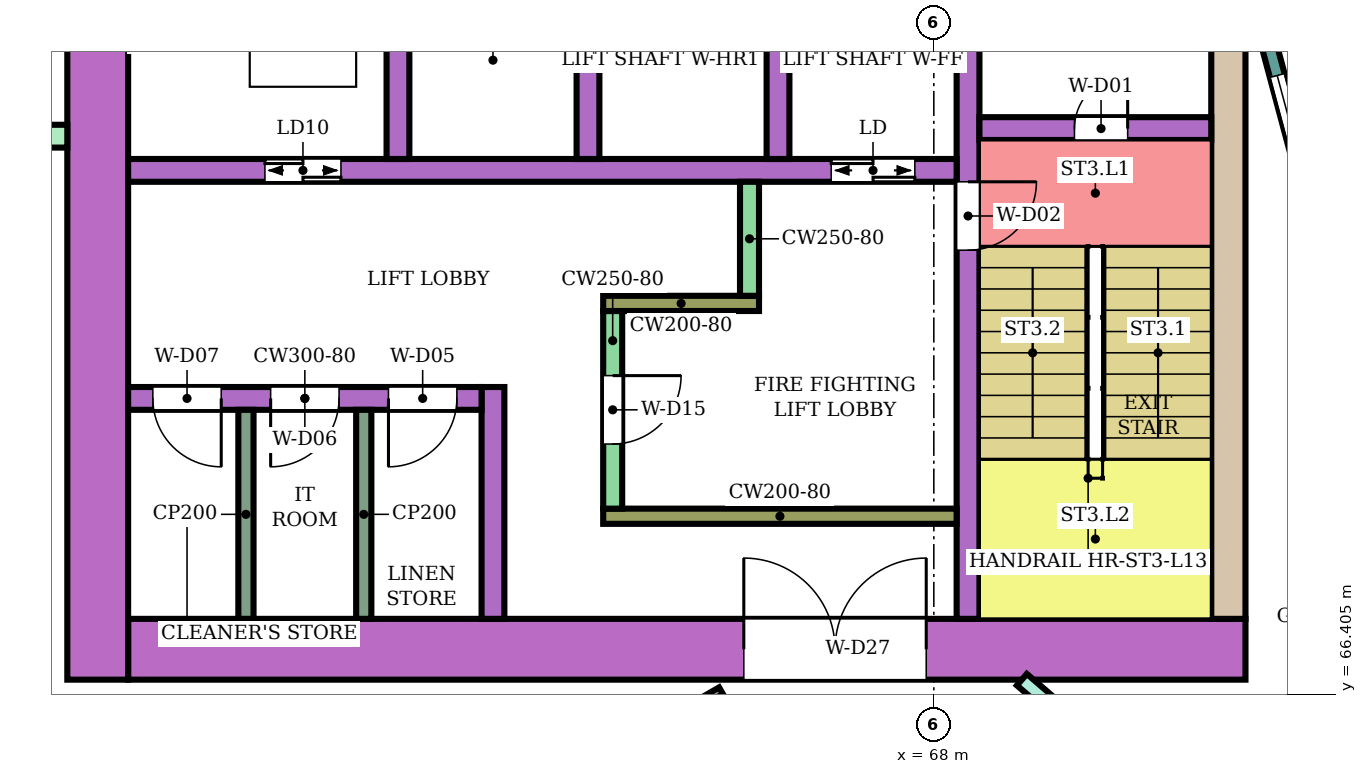
"""IFC4 building model, lengths in metres.
Left out: names, types, materials, properties, quantities, classifications, styles, units other than length and angle.
Written with IfcOpenShell. Run it as: python <this file> out.ifc"""

import sys

from ifc_helpers import new_model, si_unit, direction, frame, frame_2d, origin, place, context, subcontext, project, spatial, rectangle, extrude, element, fill, save


model = new_model("IFC4")
c1 = context("Model", 3, precision=1e-05, world=origin(), true_north=direction((0.0, 1.0)))
c2 = subcontext(c1, "Body", "Model", "MODEL_VIEW")
j1 = project(units=[si_unit("LENGTHUNIT", "METRE"), si_unit("PLANEANGLEUNIT", "RADIAN")], contexts=[c1])
p1 = place(None, origin())
s1 = spatial("IfcSite", under=j1, at=p1, CompositionType="ELEMENT")
p2 = place(p1, origin())
s2 = spatial("IfcBuilding", under=s1, at=p2, CompositionType="ELEMENT")
p3 = place(p2, frame((0.0, 0.0, 59.2)))
s3 = spatial("IfcBuildingStorey", under=s2, at=p3, CompositionType="ELEMENT", Elevation=59.2)
p4 = place(p3, frame((72.1, 67.0, 0.0), z_axis=(0.0, 0.0, 1.0), x_axis=(-1.0, 0.0, 0.0)))
e1 = element("IfcWall", 1, at=p4, inside=s3, PredefinedType="SHEAR", context=c2, shape_type="SweptSolid", body=[
    extrude(rectangle(XDim=14.7, YDim=0.8, at=frame_2d((7.35, 0.0))), origin(), (0.0, 0.0, 1.0), 3.48),
])
p5 = place(p4, frame((4.2, 0.0, 0.0)))
e2 = element("IfcOpeningElement", 2, at=p5, cuts=e1, PredefinedType="OPENING", context=c2, shape_type="SweptSolid", body=[
    extrude(rectangle(XDim=2.4, YDim=2.4, at=frame_2d((1.2, 1.2))), frame((0.0, 0.41, 0.0), z_axis=(0.0, -1.0, 0.0), x_axis=(1.0, 0.0, 0.0)), (0.0, 0.0, 1.0), 0.82),
])
p6 = place(p3, frame((71.875, 75.0, 0.0), z_axis=(0.0, 0.0, 1.0), x_axis=(0.0, -1.0, 0.0)))
e3 = element("IfcWall", 3, at=p6, inside=s3, PredefinedType="SHEAR", context=c2, shape_type="SweptSolid", body=[
    extrude(rectangle(XDim=7.6, YDim=0.45, at=frame_2d((3.8, 0.0))), origin(), (0.0, 0.0, 1.0), 3.48),
])
p7 = place(p3, frame((57.0, 83.4, 0.0), z_axis=(0.0, 0.0, 1.0), x_axis=(0.0, -1.0, 0.0)))
e4 = element("IfcWall", 4, at=p7, inside=s3, PredefinedType="SHEAR", context=c2, shape_type="SweptSolid", body=[
    extrude(rectangle(XDim=16.8, YDim=0.8, at=frame_2d((8.4, 0.0))), origin(), (0.0, 0.0, 1.0), 3.48),
])
p8 = place(p3, frame((68.45, 75.0, 0.0), z_axis=(0.0, 0.0, 1.0), x_axis=(0.0, -1.0, 0.0)))
e5 = element("IfcWall", 5, at=p8, inside=s3, PredefinedType="SHEAR", context=c2, shape_type="SweptSolid", body=[
    extrude(rectangle(XDim=7.6, YDim=0.3, at=frame_2d((3.8, 0.0))), origin(), (0.0, 0.0, 1.0), 3.48),
])
p9 = place(p8, frame((1.85, 0.0, 0.0)))
e6 = element("IfcOpeningElement", 6, at=p9, cuts=e5, PredefinedType="OPENING", context=c2, shape_type="SweptSolid", body=[
    extrude(rectangle(XDim=0.9, YDim=2.1, at=frame_2d((0.45, 1.05))), frame((0.0, 0.16, 0.0), z_axis=(0.0, -1.0, 0.0), x_axis=(1.0, 0.0, 0.0)), (0.0, 0.0, 1.0), 0.32),
])
p10 = place(p3, frame((71.65, 73.85, 0.0), z_axis=(0.0, 0.0, 1.0), x_axis=(-1.0, 0.0, 0.0)))
e7 = element("IfcWall", 7, at=p10, inside=s3, PredefinedType="SHEAR", context=c2, shape_type="SweptSolid", body=[
    extrude(rectangle(XDim=3.05, YDim=0.3, at=frame_2d((1.525, 0.0))), origin(), (0.0, 0.0, 1.0), 3.48),
])
p11 = place(p10, frame((1.1, 0.0, 0.0)))
e8 = element("IfcOpeningElement", 8, at=p11, cuts=e7, PredefinedType="OPENING", context=c2, shape_type="SweptSolid", body=[
    extrude(rectangle(XDim=0.7, YDim=2.0, at=frame_2d((0.35, 1.0))), frame((0.0, 0.16, 0.0), z_axis=(0.0, -1.0, 0.0), x_axis=(1.0, 0.0, 0.0)), (0.0, 0.0, 1.0), 0.32),
])
p12 = place(p3, frame((68.3, 73.3, 0.0), z_axis=(0.0, 0.0, 1.0), x_axis=(-1.0, 0.0, 0.0)))
e9 = element("IfcWall", 9, at=p12, inside=s3, PredefinedType="SHEAR", context=c2, shape_type="SweptSolid", body=[
    extrude(rectangle(XDim=10.9, YDim=0.3, at=frame_2d((5.45, 0.0))), origin(), (0.0, 0.0, 1.0), 3.48),
])
p13 = place(p12, frame((0.55, 0.0, 0.0)))
e10 = element("IfcOpeningElement", 10, at=p13, cuts=e9, PredefinedType="OPENING", context=c2, shape_type="SweptSolid", body=[
    extrude(rectangle(XDim=1.1, YDim=2.1, at=frame_2d((0.55, 1.05))), frame((0.0, 0.16, 0.0), z_axis=(0.0, -1.0, 0.0), x_axis=(1.0, 0.0, 0.0)), (0.0, 0.0, 1.0), 0.32),
])
p14 = place(p12, frame((8.1, 0.0, 0.0)))
e11 = element("IfcOpeningElement", 11, at=p14, cuts=e9, PredefinedType="OPENING", context=c2, shape_type="SweptSolid", body=[
    extrude(rectangle(XDim=1.0, YDim=2.1, at=frame_2d((0.5, 1.05))), frame((0.0, 0.16, 0.0), z_axis=(0.0, -1.0, 0.0), x_axis=(1.0, 0.0, 0.0)), (0.0, 0.0, 1.0), 0.32),
])
for number, where, z_axis, x_axis in (
    (12, (65.95, 76.0, 0.0), (0.0, 0.0, 1.0), (0.0, -1.0, 0.0)),
    (13, (63.45, 76.0, 0.0), (0.0, 0.0, 1.0), (0.0, -1.0, 0.0)),
    (14, (60.95, 76.0, 0.0), (0.0, 0.0, 1.0), (0.0, -1.0, 0.0)),
):
    element("IfcWall", number, at=place(p3, frame(where, z_axis=z_axis, x_axis=x_axis)), inside=s3, PredefinedType="SHEAR", context=c2, shape_type="SweptSolid", body=[
        extrude(rectangle(XDim=2.55, YDim=0.3, at=frame_2d((1.275, 0.0))), origin(), (0.0, 0.0, 1.0), 3.48),
    ])
p15 = place(p3, frame((68.3, 68.75, 0.0), z_axis=(0.0, 0.0, 1.0), x_axis=(-1.0, 0.0, 0.0)))
e15 = element("IfcWall", 15, at=p15, inside=s3, PredefinedType="SHEAR", context=c2, shape_type="SweptSolid", body=[
    extrude(rectangle(XDim=4.65, YDim=0.2, at=frame_2d((2.325, 0.0))), origin(), (0.0, 0.0, 1.0), 3.48),
])
p16 = place(p3, frame((63.775, 71.45, 0.0), z_axis=(0.0, 0.0, 1.0), x_axis=(0.0, -1.0, 0.0)))
e16 = element("IfcWall", 16, at=p16, inside=s3, PredefinedType="SHEAR", context=c2, shape_type="SweptSolid", body=[
    extrude(rectangle(XDim=2.6, YDim=0.25, at=frame_2d((1.3, 0.0))), origin(), (0.0, 0.0, 1.0), 3.48),
])
p17 = place(p16, frame((0.85, 0.0, 0.0)))
e17 = element("IfcOpeningElement", 17, at=p17, cuts=e16, PredefinedType="OPENING", context=c2, shape_type="SweptSolid", body=[
    extrude(rectangle(XDim=0.9, YDim=2.1, at=frame_2d((0.45, 1.05))), frame((0.0, 0.135, 0.0), z_axis=(0.0, -1.0, 0.0), x_axis=(1.0, 0.0, 0.0)), (0.0, 0.0, 1.0), 0.27),
])
p18 = place(p3, frame((65.7, 71.55, 0.0), z_axis=(0.0, 0.0, 1.0), x_axis=(-1.0, 0.0, 0.0)))
e18 = element("IfcWall", 18, at=p18, inside=s3, PredefinedType="SHEAR", context=c2, shape_type="SweptSolid", body=[
    extrude(rectangle(XDim=2.05, YDim=0.2, at=frame_2d((1.025, 0.0))), origin(), (0.0, 0.0, 1.0), 3.48),
])
p19 = place(p3, frame((65.575, 73.15, 0.0), z_axis=(0.0, 0.0, 1.0), x_axis=(0.0, -1.0, 0.0)))
e19 = element("IfcWall", 19, at=p19, inside=s3, PredefinedType="SHEAR", context=c2, shape_type="SweptSolid", body=[
    extrude(rectangle(XDim=1.5, YDim=0.25, at=frame_2d((0.75, 0.0))), origin(), (0.0, 0.0, 1.0), 3.48),
])
p20 = place(p3, frame((62.2, 70.45, 0.0), z_axis=(0.0, 0.0, 1.0), x_axis=(0.0, -1.0, 0.0)))
e20 = element("IfcWall", 20, at=p20, inside=s3, PredefinedType="SHEAR", context=c2, shape_type="SweptSolid", body=[
    extrude(rectangle(XDim=3.05, YDim=0.3, at=frame_2d((1.525, 0.0))), origin(), (0.0, 0.0, 1.0), 3.48),
])
p21 = place(p3, frame((62.05, 70.3, 0.0), z_axis=(0.0, 0.0, 1.0), x_axis=(-1.0, 0.0, 0.0)))
e21 = element("IfcWall", 21, at=p21, inside=s3, PredefinedType="SHEAR", context=c2, shape_type="SweptSolid", body=[
    extrude(rectangle(XDim=4.65, YDim=0.3, at=frame_2d((2.325, 0.0))), origin(), (0.0, 0.0, 1.0), 3.48),
])
p22 = place(p21, frame((0.325, 0.0, 0.0)))
e22 = element("IfcOpeningElement", 22, at=p22, cuts=e21, PredefinedType="OPENING", context=c2, shape_type="SweptSolid", body=[
    extrude(rectangle(XDim=0.9, YDim=2.1, at=frame_2d((0.45, 1.05))), frame((0.0, 0.16, 0.0), z_axis=(0.0, -1.0, 0.0), x_axis=(1.0, 0.0, 0.0)), (0.0, 0.0, 1.0), 0.32),
])
p23 = place(p21, frame((1.875, 0.0, 0.0)))
e23 = element("IfcOpeningElement", 23, at=p23, cuts=e21, PredefinedType="OPENING", context=c2, shape_type="SweptSolid", body=[
    extrude(rectangle(XDim=0.9, YDim=2.1, at=frame_2d((0.45, 1.05))), frame((0.0, 0.16, 0.0), z_axis=(0.0, -1.0, 0.0), x_axis=(1.0, 0.0, 0.0)), (0.0, 0.0, 1.0), 0.32),
])
p24 = place(p21, frame((3.425, 0.0, 0.0)))
e24 = element("IfcOpeningElement", 24, at=p24, cuts=e21, PredefinedType="OPENING", context=c2, shape_type="SweptSolid", body=[
    extrude(rectangle(XDim=0.9, YDim=2.1, at=frame_2d((0.45, 1.05))), frame((0.0, 0.16, 0.0), z_axis=(0.0, -1.0, 0.0), x_axis=(1.0, 0.0, 0.0)), (0.0, 0.0, 1.0), 0.32),
])
p25 = place(p3, frame((56.6, 73.75, 0.0), z_axis=(0.0, 0.0, 1.0), x_axis=(-1.0, 0.0, 0.0)))
e25 = element("IfcWall", 25, at=p25, inside=s3, PredefinedType="NOTDEFINED", context=c2, shape_type="SweptSolid", body=[
    extrude(rectangle(XDim=2.416, YDim=0.3, at=frame_2d((1.208, 0.0))), origin(), (0.0, 0.0, 1.0), 3.8),
])
p26 = place(p3, frame((72.396, 75.0, 0.0), z_axis=(0.0, 0.0, 1.0), x_axis=(0.258789828301, -0.965933654434, 0.0)))
e26 = element("IfcWall", 26, at=p26, inside=s3, PredefinedType="NOTDEFINED", context=c2, shape_type="SweptSolid", body=[
    extrude(rectangle(XDim=3.936, YDim=0.2, at=frame_2d((1.968, 0.0))), origin(), (0.0, 0.0, 1.0), 3.8),
])
p27 = place(p26, frame((0.468, 0.0, 0.9)))
e27 = element("IfcOpeningElement", 27, at=p27, cuts=e26, PredefinedType="OPENING", context=c2, shape_type="SweptSolid", body=[
    extrude(rectangle(XDim=3.0, YDim=2.3, at=frame_2d((1.5, 1.15))), frame((0.0, 0.11, 0.0), z_axis=(0.0, -1.0, 0.0), x_axis=(1.0, 0.0, 0.0)), (0.0, 0.0, 1.0), 0.22),
])
p28 = place(p3, frame((69.158, 66.6, 0.0), z_axis=(0.0, 0.0, 1.0), x_axis=(0.757976058094, -0.652282373943, 0.0)))
e28 = element("IfcWall", 28, at=p28, inside=s3, PredefinedType="PARTITIONING", context=c2, shape_type="SweptSolid", body=[
    extrude(rectangle(XDim=5.16, YDim=0.2, at=frame_2d((2.58, 0.0))), origin(), (0.0, 0.0, 1.0), 3.35),
])
p29 = place(p28, frame((1.6, 0.0, 0.0)))
e29 = element("IfcOpeningElement", 29, at=p29, cuts=e28, PredefinedType="OPENING", context=c2, shape_type="SweptSolid", body=[
    extrude(rectangle(XDim=1.0, YDim=2.1, at=frame_2d((0.5, 1.05))), frame((0.0, 0.11, 0.0), z_axis=(0.0, -1.0, 0.0), x_axis=(1.0, 0.0, 0.0)), (0.0, 0.0, 1.0), 0.22),
])
p30 = place(p3, frame((57.659, 62.101, 0.0), z_axis=(0.0, 0.0, 1.0), x_axis=(0.86602264145, 0.500004784474, 0.0)))
e30 = element("IfcWall", 30, at=p30, inside=s3, PredefinedType="PARTITIONING", context=c2, shape_type="SweptSolid", body=[
    extrude(rectangle(XDim=8.708, YDim=0.1, at=frame_2d((4.354, 0.0))), origin(), (0.0, 0.0, 1.0), 3.35),
])
p31 = place(p30, frame((3.929, 0.0, 0.0)))
e31 = element("IfcOpeningElement", 31, at=p31, cuts=e30, PredefinedType="OPENING", context=c2, shape_type="SweptSolid", body=[
    extrude(rectangle(XDim=0.9, YDim=2.1, at=frame_2d((0.45, 1.05))), frame((0.0, 0.06, 0.0), z_axis=(0.0, -1.0, 0.0), x_axis=(1.0, 0.0, 0.0)), (0.0, 0.0, 1.0), 0.12),
])
p32 = place(p3, frame((71.596, 64.635, 0.0), z_axis=(0.0, 0.0, 1.0), x_axis=(0.652285007511, 0.757973791748, 0.0)))
e32 = element("IfcWall", 32, at=p32, inside=s3, PredefinedType="PARTITIONING", context=c2, shape_type="SweptSolid", body=[
    extrude(rectangle(XDim=2.65, YDim=0.1, at=frame_2d((1.325, 0.0))), origin(), (0.0, 0.0, 1.0), 3.35),
])
p33 = place(p32, frame((0.6, 0.0, 0.0)))
e33 = element("IfcOpeningElement", 33, at=p33, cuts=e32, PredefinedType="OPENING", context=c2, shape_type="SweptSolid", body=[
    extrude(rectangle(XDim=0.8, YDim=2.1, at=frame_2d((0.4, 1.05))), frame((0.0, 0.06, 0.0), z_axis=(0.0, -1.0, 0.0), x_axis=(1.0, 0.0, 0.0)), (0.0, 0.0, 1.0), 0.12),
])
for number, where, z_axis, x_axis in (
    (34, (60.5, 70.15, 0.0), (0.0, 0.0, 1.0), (0.0, -1.0, 0.0)),
    (35, (58.95, 70.15, 0.0), (0.0, 0.0, 1.0), (0.0, -1.0, 0.0)),
):
    element("IfcWall", number, at=place(p3, frame(where, z_axis=z_axis, x_axis=x_axis)), inside=s3, PredefinedType="PARTITIONING", context=c2, shape_type="SweptSolid", body=[
        extrude(rectangle(XDim=2.75, YDim=0.2, at=frame_2d((1.375, 0.0))), origin(), (0.0, 0.0, 1.0), 3.48),
    ])
p34 = place(p27, origin())
e36 = element("IfcWindow", 36, at=p34, inside=s3, PartitioningType="SINGLE_PANEL", PredefinedType="WINDOW", context=c2, shape_type="SweptSolid", body=[
    extrude(rectangle(XDim=3.0, YDim=2.3, at=frame_2d((1.5, 1.15))), frame((0.0, 0.03, 0.0), z_axis=(0.0, -1.0, 0.0), x_axis=(1.0, 0.0, 0.0)), (0.0, 0.0, 1.0), 0.06),
])
fill(e27, e36)
p35 = place(p11, frame((0.7, 0.0, 0.0), z_axis=(0.0, 0.0, 1.0), x_axis=(-1.0, 0.0, 0.0)))
e37 = element("IfcDoor", 37, at=p35, inside=s3, OperationType="SINGLE_SWING_RIGHT", PredefinedType="DOOR", context=c2, shape_type="SweptSolid", body=[
    extrude(rectangle(XDim=0.7, YDim=2.0, at=frame_2d((0.35, 1.0))), frame((0.0, 0.025, 0.0), z_axis=(0.0, -1.0, 0.0), x_axis=(1.0, 0.0, 0.0)), (0.0, 0.0, 1.0), 0.05),
])
fill(e8, e37)
p36 = place(p9, origin())
e38 = element("IfcDoor", 38, at=p36, inside=s3, OperationType="SINGLE_SWING_LEFT", PredefinedType="DOOR", context=c2, shape_type="SweptSolid", body=[
    extrude(rectangle(XDim=0.9, YDim=2.1, at=frame_2d((0.45, 1.05))), frame((0.0, 0.025, 0.0), z_axis=(0.0, -1.0, 0.0), x_axis=(1.0, 0.0, 0.0)), (0.0, 0.0, 1.0), 0.05),
])
fill(e6, e38)
p37 = place(p13, origin())
e39 = element("IfcDoor", 39, at=p37, inside=s3, OperationType="DOUBLE_DOOR_SLIDING", PredefinedType="DOOR", context=c2, shape_type="SweptSolid", body=[
    extrude(rectangle(XDim=1.1, YDim=2.1, at=frame_2d((0.55, 1.05))), frame((0.0, 0.025, 0.0), z_axis=(0.0, -1.0, 0.0), x_axis=(1.0, 0.0, 0.0)), (0.0, 0.0, 1.0), 0.05),
])
fill(e10, e39)
p38 = place(p14, origin())
e40 = element("IfcDoor", 40, at=p38, inside=s3, OperationType="DOUBLE_DOOR_SLIDING", PredefinedType="DOOR", context=c2, shape_type="SweptSolid", body=[
    extrude(rectangle(XDim=1.0, YDim=2.1, at=frame_2d((0.5, 1.05))), frame((0.0, 0.025, 0.0), z_axis=(0.0, -1.0, 0.0), x_axis=(1.0, 0.0, 0.0)), (0.0, 0.0, 1.0), 0.05),
])
fill(e11, e40)
p39 = place(p17, origin())
e41 = element("IfcDoor", 41, at=p39, inside=s3, OperationType="SINGLE_SWING_LEFT", PredefinedType="DOOR", context=c2, shape_type="SweptSolid", body=[
    extrude(rectangle(XDim=0.9, YDim=2.1, at=frame_2d((0.45, 1.05))), frame((0.0, 0.025, 0.0), z_axis=(0.0, -1.0, 0.0), x_axis=(1.0, 0.0, 0.0)), (0.0, 0.0, 1.0), 0.05),
])
fill(e17, e41)
p40 = place(p22, origin())
e42 = element("IfcDoor", 42, at=p40, inside=s3, OperationType="SINGLE_SWING_RIGHT", PredefinedType="DOOR", context=c2, shape_type="SweptSolid", body=[
    extrude(rectangle(XDim=0.9, YDim=2.1, at=frame_2d((0.45, 1.05))), frame((0.0, 0.025, 0.0), z_axis=(0.0, -1.0, 0.0), x_axis=(1.0, 0.0, 0.0)), (0.0, 0.0, 1.0), 0.05),
])
fill(e22, e42)
p41 = place(p23, origin())
e43 = element("IfcDoor", 43, at=p41, inside=s3, OperationType="SINGLE_SWING_RIGHT", PredefinedType="DOOR", context=c2, shape_type="SweptSolid", body=[
    extrude(rectangle(XDim=0.9, YDim=2.1, at=frame_2d((0.45, 1.05))), frame((0.0, 0.025, 0.0), z_axis=(0.0, -1.0, 0.0), x_axis=(1.0, 0.0, 0.0)), (0.0, 0.0, 1.0), 0.05),
])
fill(e23, e43)
p42 = place(p24, origin())
e44 = element("IfcDoor", 44, at=p42, inside=s3, OperationType="SINGLE_SWING_LEFT", PredefinedType="DOOR", context=c2, shape_type="SweptSolid", body=[
    extrude(rectangle(XDim=0.9, YDim=2.1, at=frame_2d((0.45, 1.05))), frame((0.0, 0.025, 0.0), z_axis=(0.0, -1.0, 0.0), x_axis=(1.0, 0.0, 0.0)), (0.0, 0.0, 1.0), 0.05),
])
fill(e24, e44)
p43 = place(p5, frame((2.4, 0.0, 0.0), z_axis=(0.0, 0.0, 1.0), x_axis=(-1.0, 0.0, 0.0)))
e45 = element("IfcDoor", 45, at=p43, inside=s3, OperationType="DOUBLE_DOOR_SINGLE_SWING", PredefinedType="DOOR", context=c2, shape_type="SweptSolid", body=[
    extrude(rectangle(XDim=2.4, YDim=2.4, at=frame_2d((1.2, 1.2))), frame((0.0, 0.025, 0.0), z_axis=(0.0, -1.0, 0.0), x_axis=(1.0, 0.0, 0.0)), (0.0, 0.0, 1.0), 0.05),
])
fill(e2, e45)
save(model, sys.argv[1])
